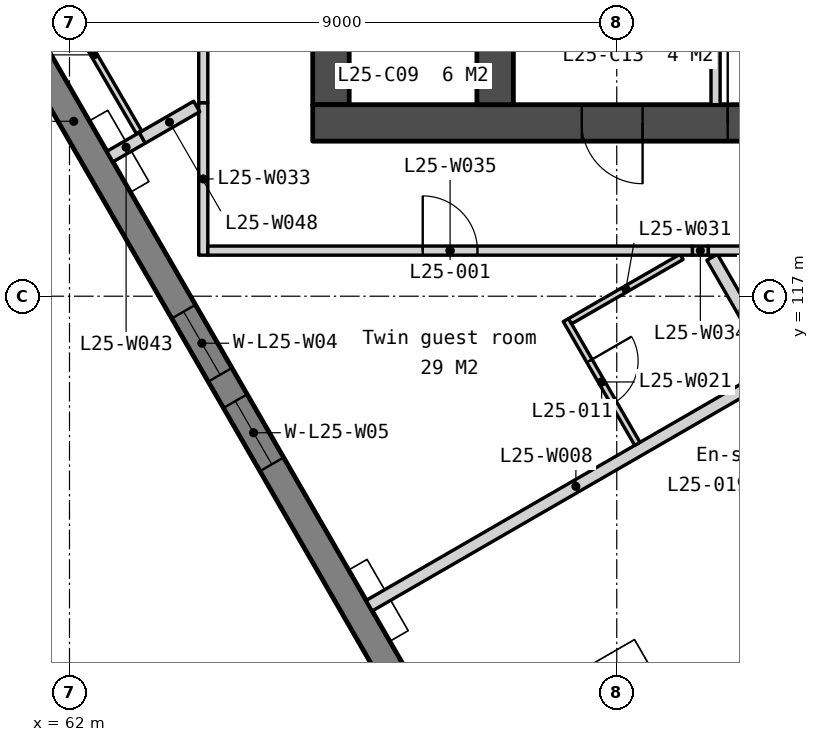
"""IFC4 building model, lengths in metres.
Left out: names, types, materials, properties, quantities, classifications, styles, units other than length and angle.
Written with IfcOpenShell. Run it as: python <this file> out.ifc"""

import sys

from ifc_helpers import new_model, si_unit, direction, frame, frame_2d, origin, place, context, subcontext, project, spatial, polyline, rectangle, outline, extrude, element, fill, save


model = new_model("IFC4")
c1 = context("Model", 3, precision=1e-05, world=origin(), true_north=direction((0.0, 1.0)))
c2 = subcontext(c1, "Body", "Model", "MODEL_VIEW")
j1 = project(units=[si_unit("LENGTHUNIT", "METRE"), si_unit("PLANEANGLEUNIT", "RADIAN")], contexts=[c1])
p1 = place(None, origin())
s1 = spatial("IfcSite", under=j1, at=p1, CompositionType="ELEMENT")
p2 = place(p1, origin())
s2 = spatial("IfcBuilding", under=s1, at=p2, CompositionType="ELEMENT")
p3 = place(p2, frame((0.0, 0.0, 102.8)))
s3 = spatial("IfcBuildingStorey", under=s2, at=p3, CompositionType="ELEMENT", Elevation=102.8)
p4 = place(p3, frame((66.3, 133.95, 0.0), z_axis=(0.0, 0.0, 1.0), x_axis=(0.0, -1.0, 0.0)))
e1 = element("IfcWall", 1, at=p4, inside=s3, PredefinedType="SOLIDWALL", context=c2, shape_type="SweptSolid", body=[
    extrude(rectangle(XDim=13.8, YDim=0.6, at=frame_2d((6.9, 0.0))), origin(), (0.0, 0.0, 1.0), 3.35),
])
p5 = place(p4, frame((0.6, 0.0, 0.0)))
e2 = element("IfcOpeningElement", 2, at=p5, cuts=e1, PredefinedType="OPENING", context=c2, shape_type="SweptSolid", body=[
    extrude(rectangle(XDim=1.1, YDim=2.1, at=frame_2d((0.55, 1.05))), frame((0.0, 0.31, 0.0), z_axis=(0.0, -1.0, 0.0), x_axis=(1.0, 0.0, 0.0)), (0.0, 0.0, 1.0), 0.62),
])
p6 = place(p4, frame((8.963, 0.0, 0.0)))
e3 = element("IfcOpeningElement", 3, at=p6, cuts=e1, PredefinedType="OPENING", context=c2, shape_type="SweptSolid", body=[
    extrude(rectangle(XDim=1.0, YDim=2.1, at=frame_2d((0.5, 1.05))), frame((0.0, 0.31, 0.0), z_axis=(0.0, -1.0, 0.0), x_axis=(1.0, 0.0, 0.0)), (0.0, 0.0, 1.0), 0.62),
])
p7 = place(p4, frame((11.888, 0.0, 0.0)))
e4 = element("IfcOpeningElement", 4, at=p7, cuts=e1, PredefinedType="OPENING", context=c2, shape_type="SweptSolid", body=[
    extrude(rectangle(XDim=1.0, YDim=2.1, at=frame_2d((0.5, 1.05))), frame((0.0, 0.31, 0.0), z_axis=(0.0, -1.0, 0.0), x_axis=(1.0, 0.0, 0.0)), (0.0, 0.0, 1.0), 0.62),
])
p8 = place(p3, frame((66.0, 119.85, 0.0), z_axis=(0.0, 0.0, 1.0), x_axis=(1.0, 0.0, 0.0)))
e5 = element("IfcWall", 5, at=p8, inside=s3, PredefinedType="SOLIDWALL", context=c2, shape_type="SweptSolid", body=[
    extrude(rectangle(XDim=28.0, YDim=0.6, at=frame_2d((14.0, 0.0))), origin(), (0.0, 0.0, 1.0), 3.35),
])
p9 = place(p8, frame((6.825, 0.0, 0.0)))
e6 = element("IfcOpeningElement", 6, at=p9, cuts=e5, PredefinedType="OPENING", context=c2, shape_type="SweptSolid", body=[
    extrude(rectangle(XDim=1.8, YDim=2.1, at=frame_2d((0.9, 1.05))), frame((0.0, 0.31, 0.0), z_axis=(0.0, -1.0, 0.0), x_axis=(1.0, 0.0, 0.0)), (0.0, 0.0, 1.0), 0.62),
])
p10 = place(p8, frame((15.85, 0.0, 0.0)))
e7 = element("IfcOpeningElement", 7, at=p10, cuts=e5, PredefinedType="OPENING", context=c2, shape_type="SweptSolid", body=[
    extrude(rectangle(XDim=1.5, YDim=2.1, at=frame_2d((0.75, 1.05))), frame((0.0, 0.31, 0.0), z_axis=(0.0, -1.0, 0.0), x_axis=(1.0, 0.0, 0.0)), (0.0, 0.0, 1.0), 0.62),
])
p11 = place(p8, frame((19.375, 0.0, 0.0)))
e8 = element("IfcOpeningElement", 8, at=p11, cuts=e5, PredefinedType="OPENING", context=c2, shape_type="SweptSolid", body=[
    extrude(rectangle(XDim=1.8, YDim=2.1, at=frame_2d((0.9, 1.05))), frame((0.0, 0.31, 0.0), z_axis=(0.0, -1.0, 0.0), x_axis=(1.0, 0.0, 0.0)), (0.0, 0.0, 1.0), 0.62),
])
p12 = place(p8, frame((4.425, 0.0, 0.0)))
e9 = element("IfcOpeningElement", 9, at=p12, cuts=e5, PredefinedType="OPENING", context=c2, shape_type="SweptSolid", body=[
    extrude(rectangle(XDim=1.0, YDim=2.1, at=frame_2d((0.5, 1.05))), frame((0.0, 0.31, 0.0), z_axis=(0.0, -1.0, 0.0), x_axis=(1.0, 0.0, 0.0)), (0.0, 0.0, 1.0), 0.62),
])
p13 = place(p8, frame((9.783, 0.0, 0.0)))
e10 = element("IfcOpeningElement", 10, at=p13, cuts=e5, PredefinedType="OPENING", context=c2, shape_type="SweptSolid", body=[
    extrude(rectangle(XDim=1.0, YDim=2.1, at=frame_2d((0.5, 1.05))), frame((0.0, 0.31, 0.0), z_axis=(0.0, -1.0, 0.0), x_axis=(1.0, 0.0, 0.0)), (0.0, 0.0, 1.0), 0.62),
])
p14 = place(p8, frame((11.525, 0.0, 0.0)))
e11 = element("IfcOpeningElement", 11, at=p14, cuts=e5, PredefinedType="OPENING", context=c2, shape_type="SweptSolid", body=[
    extrude(rectangle(XDim=1.0, YDim=2.1, at=frame_2d((0.5, 1.05))), frame((0.0, 0.31, 0.0), z_axis=(0.0, -1.0, 0.0), x_axis=(1.0, 0.0, 0.0)), (0.0, 0.0, 1.0), 0.62),
])
p15 = place(p8, frame((13.658, 0.0, 0.0)))
e12 = element("IfcOpeningElement", 12, at=p15, cuts=e5, PredefinedType="OPENING", context=c2, shape_type="SweptSolid", body=[
    extrude(rectangle(XDim=1.0, YDim=2.1, at=frame_2d((0.5, 1.05))), frame((0.0, 0.31, 0.0), z_axis=(0.0, -1.0, 0.0), x_axis=(1.0, 0.0, 0.0)), (0.0, 0.0, 1.0), 0.62),
])
p16 = place(p8, frame((22.575, 0.0, 0.0)))
e13 = element("IfcOpeningElement", 13, at=p16, cuts=e5, PredefinedType="OPENING", context=c2, shape_type="SweptSolid", body=[
    extrude(rectangle(XDim=1.0, YDim=2.1, at=frame_2d((0.5, 1.05))), frame((0.0, 0.31, 0.0), z_axis=(0.0, -1.0, 0.0), x_axis=(1.0, 0.0, 0.0)), (0.0, 0.0, 1.0), 0.62),
])
p17 = place(p3, frame((69.0, 122.25, 0.0), z_axis=(0.0, 0.0, 1.0), x_axis=(0.0, -1.0, 0.0)))
e14 = element("IfcWall", 14, at=p17, inside=s3, PredefinedType="SOLIDWALL", context=c2, shape_type="SweptSolid", body=[
    extrude(rectangle(XDim=2.1, YDim=0.6, at=frame_2d((1.05, 0.0))), origin(), (0.0, 0.0, 1.0), 3.35),
])
p18 = place(p3, frame((72.625, 122.25, 0.0), z_axis=(0.0, 0.0, 1.0), x_axis=(0.0, -1.0, 0.0)))
e15 = element("IfcWall", 15, at=p18, inside=s3, PredefinedType="PARTITIONING", context=c2, shape_type="SweptSolid", body=[
    extrude(rectangle(XDim=2.1, YDim=0.15, at=frame_2d((1.05, 0.0))), origin(), (0.0, 0.0, 1.0), 3.35),
])
p19 = place(p3, frame((56.073, 130.263, -0.15), z_axis=(0.0, 0.0, 1.0), x_axis=(0.500002343971, -0.866024050488, 0.0)))
e16 = element("IfcWall", 16, at=p19, inside=s3, PredefinedType="SOLIDWALL", context=c2, shape_type="SweptSolid", body=[
    extrude(outline(polyline([(0.0, 0.0), (0.0, 3.5), (23.986, 3.5), (23.986, 0.0), (0.0, 0.0)])), frame((0.0, 0.225, 0.0), z_axis=(0.0, -1.0, 0.0), x_axis=(1.0, 0.0, 0.0)), (0.0, 0.0, 1.0), 0.45),
])
p20 = place(p19, frame((0.72, 0.0, 1.05)))
e17 = element("IfcOpeningElement", 17, at=p20, cuts=e16, PredefinedType="OPENING", context=c2, shape_type="SweptSolid", body=[
    extrude(rectangle(XDim=1.2, YDim=1.5, at=frame_2d((0.6, 0.75))), frame((0.0, 0.235, 0.0), z_axis=(0.0, -1.0, 0.0), x_axis=(1.0, 0.0, 0.0)), (0.0, 0.0, 1.0), 0.47),
])
p21 = place(p19, frame((7.079, 0.0, 1.05)))
e18 = element("IfcOpeningElement", 18, at=p21, cuts=e16, PredefinedType="OPENING", context=c2, shape_type="SweptSolid", body=[
    extrude(rectangle(XDim=1.2, YDim=1.5, at=frame_2d((0.6, 0.75))), frame((0.0, 0.235, 0.0), z_axis=(0.0, -1.0, 0.0), x_axis=(1.0, 0.0, 0.0)), (0.0, 0.0, 1.0), 0.47),
])
p22 = place(p19, frame((8.779, 0.0, 1.05)))
e19 = element("IfcOpeningElement", 19, at=p22, cuts=e16, PredefinedType="OPENING", context=c2, shape_type="SweptSolid", body=[
    extrude(rectangle(XDim=1.2, YDim=1.5, at=frame_2d((0.6, 0.75))), frame((0.0, 0.235, 0.0), z_axis=(0.0, -1.0, 0.0), x_axis=(1.0, 0.0, 0.0)), (0.0, 0.0, 1.0), 0.47),
])
p23 = place(p19, frame((15.607, 0.0, 1.05)))
e20 = element("IfcOpeningElement", 20, at=p23, cuts=e16, PredefinedType="OPENING", context=c2, shape_type="SweptSolid", body=[
    extrude(rectangle(XDim=1.2, YDim=1.5, at=frame_2d((0.6, 0.75))), frame((0.0, 0.235, 0.0), z_axis=(0.0, -1.0, 0.0), x_axis=(1.0, 0.0, 0.0)), (0.0, 0.0, 1.0), 0.47),
])
p24 = place(p19, frame((17.307, 0.0, 1.05)))
e21 = element("IfcOpeningElement", 21, at=p24, cuts=e16, PredefinedType="OPENING", context=c2, shape_type="SweptSolid", body=[
    extrude(rectangle(XDim=1.2, YDim=1.5, at=frame_2d((0.6, 0.75))), frame((0.0, 0.235, 0.0), z_axis=(0.0, -1.0, 0.0), x_axis=(1.0, 0.0, 0.0)), (0.0, 0.0, 1.0), 0.47),
])
p25 = place(p2, frame((0.0, 0.0, 99.3)))
s4 = spatial("IfcBuildingStorey", under=s2, at=p25, CompositionType="ELEMENT", Elevation=99.3)
p26 = place(p25, frame((67.984, 109.183, 0.0), z_axis=(0.0, 0.0, 1.0), x_axis=(0.866047669374, 0.499961432884, 0.0)))
e22 = element("IfcWall", 22, at=p26, inside=s4, PredefinedType="SOLIDWALL", context=c2, shape_type="SweptSolid", body=[
    extrude(rectangle(XDim=3.95, YDim=0.45, at=frame_2d((1.975, 0.0))), origin(), (0.0, 0.0, 1.0), 6.85),
])
p27 = place(p3, frame((66.929, 111.91, 0.0), z_axis=(0.0, 0.0, 1.0), x_axis=(0.866021914183, 0.500006044118, 0.0)))
e23 = element("IfcWall", 23, at=p27, inside=s3, PredefinedType="PARTITIONING", context=c2, shape_type="SweptSolid", body=[
    extrude(rectangle(XDim=7.85, YDim=0.2, at=frame_2d((3.925, 0.0))), origin(), (0.0, 0.0, 1.0), 3.35),
])
p28 = place(p3, frame((70.164, 116.607, 0.0), z_axis=(0.0, 0.0, 1.0), x_axis=(0.499938297808, -0.866061024631, 0.0)))
e24 = element("IfcWall", 24, at=p28, inside=s3, PredefinedType="PARTITIONING", context=c2, shape_type="SweptSolid", body=[
    extrude(rectangle(XDim=2.35, YDim=0.1, at=frame_2d((1.175, 0.0))), origin(), (0.0, 0.0, 1.0), 3.35),
])
p29 = place(p28, frame((0.775, 0.0, 0.0)))
e25 = element("IfcOpeningElement", 25, at=p29, cuts=e24, PredefinedType="OPENING", context=c2, shape_type="SweptSolid", body=[
    extrude(rectangle(XDim=0.8, YDim=2.1, at=frame_2d((0.4, 1.05))), frame((0.0, 0.06, 0.0), z_axis=(0.0, -1.0, 0.0), x_axis=(1.0, 0.0, 0.0)), (0.0, 0.0, 1.0), 0.12),
])
p30 = place(p3, frame((70.232, 116.589, 0.0), z_axis=(0.0, 0.0, 1.0), x_axis=(0.866028160477, 0.499995225238, 0.0)))
e26 = element("IfcWall", 26, at=p30, inside=s3, PredefinedType="PARTITIONING", context=c2, shape_type="SweptSolid", body=[
    extrude(rectangle(XDim=2.118, YDim=0.1, at=frame_2d((1.059, 0.0))), origin(), (0.0, 0.0, 1.0), 3.35),
])
p31 = place(p3, frame((64.2, 117.675, 0.0), z_axis=(0.0, 0.0, 1.0), x_axis=(0.0, 1.0, 0.0)))
e27 = element("IfcWall", 27, at=p31, inside=s3, PredefinedType="PARTITIONING", context=c2, shape_type="SweptSolid", body=[
    extrude(rectangle(XDim=2.508, YDim=0.15, at=frame_2d((1.254, 0.0))), origin(), (0.0, 0.0, 1.0), 3.35),
])
p32 = place(p3, frame((72.244, 117.75, 0.0), z_axis=(0.0, 0.0, 1.0), x_axis=(1.0, 0.0, 0.0)))
e28 = element("IfcWall", 28, at=p32, inside=s3, PredefinedType="PARTITIONING", context=c2, shape_type="SweptSolid", body=[
    extrude(rectangle(XDim=0.263, YDim=0.15, at=frame_2d((0.131, 0.0))), origin(), (0.0, 0.0, 1.0), 3.35),
])
p33 = place(p3, frame((64.275, 117.75, 0.0), z_axis=(0.0, 0.0, 1.0), x_axis=(1.0, 0.0, 0.0)))
e29 = element("IfcWall", 29, at=p33, inside=s3, PredefinedType="PARTITIONING", context=c2, shape_type="SweptSolid", body=[
    extrude(rectangle(XDim=7.969, YDim=0.15, at=frame_2d((3.984, 0.0))), origin(), (0.0, 0.0, 1.0), 3.35),
])
p34 = place(p33, frame((3.534, 0.0, 0.0)))
e30 = element("IfcOpeningElement", 30, at=p34, cuts=e29, PredefinedType="OPENING", context=c2, shape_type="SweptSolid", body=[
    extrude(rectangle(XDim=0.9, YDim=2.1, at=frame_2d((0.45, 1.05))), frame((0.0, 0.085, 0.0), z_axis=(0.0, -1.0, 0.0), x_axis=(1.0, 0.0, 0.0)), (0.0, 0.0, 1.0), 0.17),
])
p35 = place(p3, frame((72.569, 117.642, 0.0), z_axis=(0.0, 0.0, 1.0), x_axis=(0.49976748816, -0.866159602948, 0.0)))
e31 = element("IfcWall", 31, at=p35, inside=s3, PredefinedType="PARTITIONING", context=c2, shape_type="SweptSolid", body=[
    extrude(rectangle(XDim=2.034, YDim=0.2, at=frame_2d((1.017, 0.0))), origin(), (0.0, 0.0, 1.0), 3.35),
])
p36 = place(p3, frame((72.506, 117.75, 0.0), z_axis=(0.0, 0.0, 1.0), x_axis=(1.0, 0.0, 0.0)))
e32 = element("IfcWall", 32, at=p36, inside=s3, PredefinedType="PARTITIONING", context=c2, shape_type="SweptSolid", body=[
    extrude(rectangle(XDim=3.912, YDim=0.15, at=frame_2d((1.956, 0.0))), origin(), (0.0, 0.0, 1.0), 3.35),
])
p37 = place(p3, frame((62.665, 119.296, 0.0), z_axis=(0.0, 0.0, 1.0), x_axis=(0.86615915044, 0.499768272412, 0.0)))
e33 = element("IfcWall", 33, at=p37, inside=s3, PredefinedType="PARTITIONING", context=c2, shape_type="SweptSolid", body=[
    extrude(rectangle(XDim=0.615, YDim=0.2, at=frame_2d((0.308, 0.0))), origin(), (0.0, 0.0, 1.0), 3.35),
])
p38 = place(p3, frame((61.663, 122.24, 0.0), z_axis=(0.0, 0.0, 1.0), x_axis=(0.502884554521, -0.864353587847, 0.0)))
e34 = element("IfcWall", 34, at=p38, inside=s3, PredefinedType="PARTITIONING", context=c2, shape_type="SweptSolid", body=[
    extrude(rectangle(XDim=2.94, YDim=0.1, at=frame_2d((1.47, 0.0))), origin(), (0.0, 0.0, 1.0), 3.35),
])
p39 = place(p3, frame((63.197, 119.604, 0.0), z_axis=(0.0, 0.0, 1.0), x_axis=(0.866067506982, 0.499927068031, 0.0)))
e35 = element("IfcWall", 35, at=p39, inside=s3, PredefinedType="PARTITIONING", context=c2, shape_type="SweptSolid", body=[
    extrude(rectangle(XDim=1.033, YDim=0.2, at=frame_2d((0.517, 0.0))), origin(), (0.0, 0.0, 1.0), 3.35),
])
p40 = place(p3, frame((64.2, 120.183, 0.0), z_axis=(0.0, 0.0, 1.0), x_axis=(0.0, 1.0, 0.0)))
e36 = element("IfcWall", 36, at=p40, inside=s3, PredefinedType="PARTITIONING", context=c2, shape_type="SweptSolid", body=[
    extrude(rectangle(XDim=3.464, YDim=0.15, at=frame_2d((1.732, 0.0))), origin(), (0.0, 0.0, 1.0), 3.35),
])
p41 = place(p9, origin())
e37 = element("IfcDoor", 37, at=p41, inside=s3, OperationType="DOUBLE_DOOR_DOUBLE_SWING", PredefinedType="DOOR", context=c2, shape_type="SweptSolid", body=[
    extrude(rectangle(XDim=1.8, YDim=2.1, at=frame_2d((0.9, 1.05))), frame((0.0, 0.025, 0.0), z_axis=(0.0, -1.0, 0.0), x_axis=(1.0, 0.0, 0.0)), (0.0, 0.0, 1.0), 0.05),
])
fill(e6, e37)
p42 = place(p12, origin())
e38 = element("IfcDoor", 38, at=p42, inside=s3, OperationType="SINGLE_SWING_RIGHT", PredefinedType="DOOR", context=c2, shape_type="SweptSolid", body=[
    extrude(rectangle(XDim=1.0, YDim=2.1, at=frame_2d((0.5, 1.05))), frame((0.0, 0.025, 0.0), z_axis=(0.0, -1.0, 0.0), x_axis=(1.0, 0.0, 0.0)), (0.0, 0.0, 1.0), 0.05),
])
fill(e9, e38)
p43 = place(p23, origin())
e39 = element("IfcWindow", 39, at=p43, inside=s3, PartitioningType="SINGLE_PANEL", PredefinedType="WINDOW", context=c2, shape_type="SweptSolid", body=[
    extrude(rectangle(XDim=1.2, YDim=1.5, at=frame_2d((0.6, 0.75))), frame((0.0, 0.03, 0.0), z_axis=(0.0, -1.0, 0.0), x_axis=(1.0, 0.0, 0.0)), (0.0, 0.0, 1.0), 0.06),
])
fill(e20, e39)
p44 = place(p24, origin())
e40 = element("IfcWindow", 40, at=p44, inside=s3, PartitioningType="SINGLE_PANEL", PredefinedType="WINDOW", context=c2, shape_type="SweptSolid", body=[
    extrude(rectangle(XDim=1.2, YDim=1.5, at=frame_2d((0.6, 0.75))), frame((0.0, 0.03, 0.0), z_axis=(0.0, -1.0, 0.0), x_axis=(1.0, 0.0, 0.0)), (0.0, 0.0, 1.0), 0.06),
])
fill(e21, e40)
p45 = place(p34, origin())
e41 = element("IfcDoor", 41, at=p45, inside=s3, OperationType="SINGLE_SWING_LEFT", PredefinedType="DOOR", context=c2, shape_type="SweptSolid", body=[
    extrude(rectangle(XDim=0.9, YDim=2.1, at=frame_2d((0.45, 1.05))), frame((0.0, 0.025, 0.0), z_axis=(0.0, -1.0, 0.0), x_axis=(1.0, 0.0, 0.0)), (0.0, 0.0, 1.0), 0.05),
])
fill(e30, e41)
p46 = place(p29, origin())
e42 = element("IfcDoor", 42, at=p46, inside=s3, OperationType="SINGLE_SWING_LEFT", PredefinedType="DOOR", context=c2, shape_type="SweptSolid", body=[
    extrude(rectangle(XDim=0.8, YDim=2.1, at=frame_2d((0.4, 1.05))), frame((0.0, 0.025, 0.0), z_axis=(0.0, -1.0, 0.0), x_axis=(1.0, 0.0, 0.0)), (0.0, 0.0, 1.0), 0.05),
])
fill(e25, e42)
save(model, sys.argv[1])
